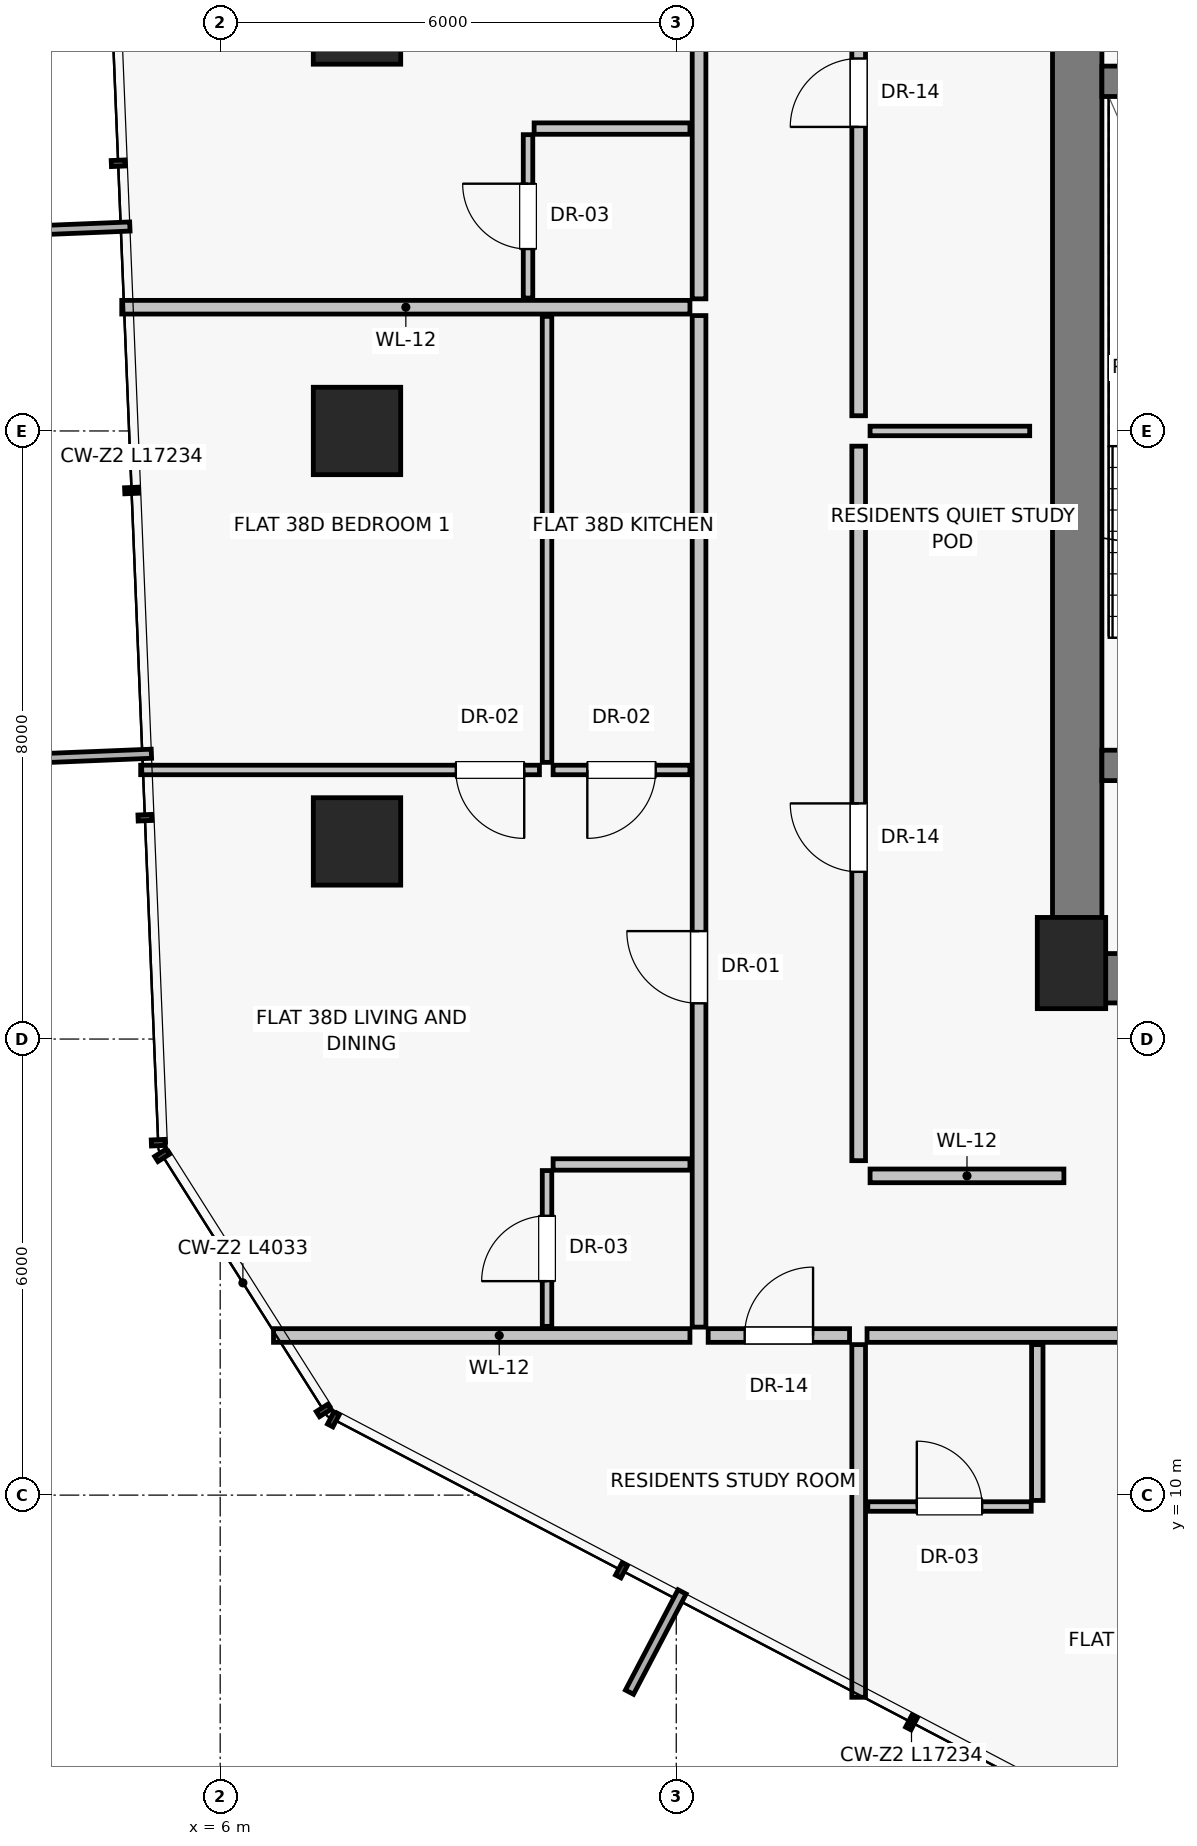
"""IFC4 building model, lengths in metres.
Left out: names, types, materials, properties, quantities, classifications, styles, units other than length and angle.
Written with IfcOpenShell. Run it as: python <this file> out.ifc"""

import sys

from ifc_helpers import new_model, si_unit, direction, frame, frame_2d, origin, origin_2d, place, context, subcontext, project, spatial, rectangle, extrude, source, transform, mapped, element, fill, save


model = new_model("IFC4")
c1 = context("Model", 3, precision=1e-05, world=origin(), true_north=direction((0.0, 1.0)))
c2 = subcontext(c1, "Body", "Model", "MODEL_VIEW")
j1 = project(units=[si_unit("LENGTHUNIT", "METRE"), si_unit("PLANEANGLEUNIT", "RADIAN")], contexts=[c1])
p1 = place(None, origin())
s1 = spatial("IfcSite", under=j1, at=p1, CompositionType="ELEMENT")
p2 = place(p1, origin())
s2 = spatial("IfcBuilding", under=s1, at=p2, CompositionType="ELEMENT")
p3 = place(p2, frame((0.0, 0.0, 136.0)))
s3 = spatial("IfcBuildingStorey", under=s2, at=p3, CompositionType="ELEMENT", Elevation=136.0)
p4 = place(p3, frame((17.2, 17.0, 0.0), z_axis=(0.0, 0.0, 1.0), x_axis=(1.0, 0.0, 0.0)))
e1 = element("IfcColumn", 1, at=p4, inside=s3, PredefinedType="PILASTER", context=c2, shape_type="SweptSolid", body=[
    extrude(rectangle(XDim=0.9, YDim=1.2, at=origin_2d()), origin(), (0.0, 0.0, 1.0), 3.25),
])
for number, where, z_axis, x_axis in (
    (2, (7.8, 29.4, 0.0), (0.0, 0.0, 1.0), (1.0, 0.0, 0.0)),
    (3, (7.8, 24.0, 0.0), (0.0, 0.0, 1.0), (1.0, 0.0, 0.0)),
    (4, (7.8, 18.6, 0.0), (0.0, 0.0, 1.0), (1.0, 0.0, 0.0)),
):
    element("IfcColumn", number, at=place(p3, frame(where, z_axis=z_axis, x_axis=x_axis)), inside=s3, PredefinedType="COLUMN", context=c2, shape_type="SweptSolid", body=[
        extrude(rectangle(XDim=1.15, YDim=1.15, at=origin_2d()), origin(), (0.0, 0.0, 1.0), 3.25),
    ])
p5 = place(p3, frame((17.275, 16.8, 0.0), z_axis=(0.0, 0.0, 1.0), x_axis=(0.0, 1.0, 0.0)))
e5 = element("IfcWall", 5, at=p5, inside=s3, PredefinedType="SHEAR", context=c2, shape_type="SweptSolid", body=[
    extrude(rectangle(XDim=14.2, YDim=0.65, at=frame_2d((7.1, 0.0))), origin(), (0.0, 0.0, 1.0), 3.0),
])
p6 = place(p3, frame((17.2, 16.8, 0.0), z_axis=(0.0, 0.0, 1.0), x_axis=(1.0, 0.0, 0.0)))
e6 = element("IfcWall", 6, at=p6, inside=s3, PredefinedType="SHEAR", context=c2, shape_type="SweptSolid", body=[
    extrude(rectangle(XDim=5.85, YDim=0.65, at=frame_2d((2.925, 0.0))), origin(), (0.0, 0.0, 1.0), 3.0),
])
p7 = place(p6, frame((1.15, 0.0, 0.0)))
e7 = element("IfcOpeningElement", 7, at=p7, cuts=e6, PredefinedType="OPENING", context=c2, shape_type="SweptSolid", body=[
    extrude(rectangle(XDim=1.2, YDim=2.03, at=frame_2d((0.6, 1.015))), frame((0.0, 0.335, 0.0), z_axis=(0.0, -1.0, 0.0), x_axis=(1.0, 0.0, 0.0)), (0.0, 0.0, 1.0), 0.67),
])
p8 = place(p3, frame((17.6, 19.6, 0.0), z_axis=(0.0, 0.0, 1.0), x_axis=(1.0, 0.0, 0.0)))
e8 = element("IfcWall", 8, at=p8, inside=s3, PredefinedType="SHEAR", context=c2, shape_type="SweptSolid", body=[
    extrude(rectangle(XDim=3.4, YDim=0.4, at=frame_2d((1.7, 0.0))), origin(), (0.0, 0.0, 1.0), 3.0),
])
p9 = place(p8, frame((1.05, 0.0, 0.0)))
e9 = element("IfcOpeningElement", 9, at=p9, cuts=e8, PredefinedType="OPENING", context=c2, shape_type="SweptSolid", body=[
    extrude(rectangle(XDim=1.1, YDim=2.03, at=frame_2d((0.55, 1.015))), frame((0.0, 0.21, 0.0), z_axis=(0.0, -1.0, 0.0), x_axis=(1.0, 0.0, 0.0)), (0.0, 0.0, 1.0), 0.42),
])
p10 = place(p3, frame((17.6, 28.6, 0.0), z_axis=(0.0, 0.0, 1.0), x_axis=(1.0, 0.0, 0.0)))
e10 = element("IfcWall", 10, at=p10, inside=s3, PredefinedType="SHEAR", context=c2, shape_type="SweptSolid", body=[
    extrude(rectangle(XDim=3.4, YDim=0.4, at=frame_2d((1.7, 0.0))), origin(), (0.0, 0.0, 1.0), 3.0),
])
p11 = place(p3, frame((14.4, 14.4, 0.0), z_axis=(0.0, 0.0, 1.0), x_axis=(0.0, 1.0, 0.0)))
e11 = element("IfcWall", 11, at=p11, inside=s3, PredefinedType="PARTITIONING", context=c2, shape_type="SweptSolid", body=[
    extrude(rectangle(XDim=9.4, YDim=0.18, at=frame_2d((4.7, 0.0))), origin(), (0.0, 0.0, 1.0), 3.0),
])
p12 = place(p11, frame((3.8, 0.0, 0.0)))
e12 = element("IfcOpeningElement", 12, at=p12, cuts=e11, PredefinedType="OPENING", context=c2, shape_type="SweptSolid", body=[
    extrude(rectangle(XDim=0.9, YDim=2.01, at=frame_2d((0.45, 1.005))), frame((0.0, 0.1, 0.0), z_axis=(0.0, -1.0, 0.0), x_axis=(1.0, 0.0, 0.0)), (0.0, 0.0, 1.0), 0.2),
])
p13 = place(p3, frame((14.4, 24.2, 0.0), z_axis=(0.0, 0.0, 1.0), x_axis=(0.0, 1.0, 0.0)))
e13 = element("IfcWall", 13, at=p13, inside=s3, PredefinedType="PARTITIONING", context=c2, shape_type="SweptSolid", body=[
    extrude(rectangle(XDim=9.2, YDim=0.18, at=frame_2d((4.6, 0.0))), origin(), (0.0, 0.0, 1.0), 3.0),
])
p14 = place(p13, frame((3.8, 0.0, 0.0)))
e14 = element("IfcOpeningElement", 14, at=p14, cuts=e13, PredefinedType="OPENING", context=c2, shape_type="SweptSolid", body=[
    extrude(rectangle(XDim=0.9, YDim=2.01, at=frame_2d((0.45, 1.005))), frame((0.0, 0.1, 0.0), z_axis=(0.0, -1.0, 0.0), x_axis=(1.0, 0.0, 0.0)), (0.0, 0.0, 1.0), 0.2),
])
p15 = place(p3, frame((14.55, 24.0, 0.0), z_axis=(0.0, 0.0, 1.0), x_axis=(1.0, 0.0, 0.0)))
e15 = element("IfcWall", 15, at=p15, inside=s3, PredefinedType="PARTITIONING", context=c2, shape_type="SweptSolid", body=[
    extrude(rectangle(XDim=2.1, YDim=0.125, at=frame_2d((1.05, 0.0))), origin(), (0.0, 0.0, 1.0), 3.0),
])
p16 = place(p3, frame((14.55, 14.2, 0.0), z_axis=(0.0, 0.0, 1.0), x_axis=(1.0, 0.0, 0.0)))
e16 = element("IfcWall", 16, at=p16, inside=s3, PredefinedType="PARTITIONING", context=c2, shape_type="SweptSolid", body=[
    extrude(rectangle(XDim=2.55, YDim=0.18, at=frame_2d((1.275, 0.0))), origin(), (0.0, 0.0, 1.0), 3.0),
])
p17 = place(p3, frame((14.4, 11.98, 0.0), z_axis=(0.0, 0.0, 1.0), x_axis=(0.0, -1.0, 0.0)))
e17 = element("IfcWall", 17, at=p17, inside=s3, PredefinedType="PARTITIONING", context=c2, shape_type="SweptSolid", body=[
    extrude(rectangle(XDim=4.64, YDim=0.18, at=frame_2d((2.32, 0.0))), origin(), (0.0, 0.0, 1.0), 3.0),
])
p18 = place(p3, frame((14.51, 12.1, 0.0), z_axis=(0.0, 0.0, 1.0), x_axis=(1.0, 0.0, 0.0)))
e18 = element("IfcWall", 18, at=p18, inside=s3, PredefinedType="PARTITIONING", context=c2, shape_type="SweptSolid", body=[
    extrude(rectangle(XDim=5.996, YDim=0.18, at=frame_2d((2.998, 0.0))), origin(), (0.0, 0.0, 1.0), 2.58),
])
p19 = place(p18, frame((3.638, 0.0, 0.0)))
e19 = element("IfcOpeningElement", 19, at=p19, cuts=e18, PredefinedType="OPENING", context=c2, shape_type="SweptSolid", body=[
    extrude(rectangle(XDim=0.95, YDim=2.02, at=frame_2d((0.475, 1.01))), frame((0.0, 0.1, 0.0), z_axis=(0.0, -1.0, 0.0), x_axis=(1.0, 0.0, 0.0)), (0.0, 0.0, 1.0), 0.2),
])
p20 = place(p3, frame((16.75, 11.98, 0.0), z_axis=(0.0, 0.0, 1.0), x_axis=(0.0, -1.0, 0.0)))
e20 = element("IfcWall", 20, at=p20, inside=s3, PredefinedType="PARTITIONING", context=c2, shape_type="SweptSolid", body=[
    extrude(rectangle(XDim=2.05, YDim=0.15, at=frame_2d((1.025, 0.0))), origin(), (0.0, 0.0, 1.0), 3.0),
])
p21 = place(p3, frame((14.52, 9.85, 0.0), z_axis=(0.0, 0.0, 1.0), x_axis=(1.0, 0.0, 0.0)))
e21 = element("IfcWall", 21, at=p21, inside=s3, PredefinedType="PARTITIONING", context=c2, shape_type="SweptSolid", body=[
    extrude(rectangle(XDim=2.15, YDim=0.125, at=frame_2d((1.075, 0.0))), origin(), (0.0, 0.0, 1.0), 3.0),
])
p22 = place(p21, frame((0.645, 0.0, 0.0)))
e22 = element("IfcOpeningElement", 22, at=p22, cuts=e21, PredefinedType="OPENING", context=c2, shape_type="SweptSolid", body=[
    extrude(rectangle(XDim=0.86, YDim=2.01, at=frame_2d((0.43, 1.005))), frame((0.0, 0.073, 0.0), z_axis=(0.0, -1.0, 0.0), x_axis=(1.0, 0.0, 0.0)), (0.0, 0.0, 1.0), 0.145),
])
p23 = place(p3, frame((12.18, 12.1, 0.0), z_axis=(0.0, 0.0, 1.0), x_axis=(-1.0, 0.0, 0.0)))
e23 = element("IfcWall", 23, at=p23, inside=s3, PredefinedType="PARTITIONING", context=c2, shape_type="SweptSolid", body=[
    extrude(rectangle(XDim=5.479, YDim=0.18, at=frame_2d((2.739, 0.0))), origin(), (0.0, 0.0, 1.0), 3.0),
])
p24 = place(p3, frame((12.3, 12.21, 0.0), z_axis=(0.0, 0.0, 1.0), x_axis=(0.0, 1.0, 0.0)))
e24 = element("IfcWall", 24, at=p24, inside=s3, PredefinedType="PARTITIONING", context=c2, shape_type="SweptSolid", body=[
    extrude(rectangle(XDim=13.308, YDim=0.18, at=frame_2d((6.654, 0.0))), origin(), (0.0, 0.0, 1.0), 2.58),
])
p25 = place(p24, frame((4.26, 0.0, 0.0)))
e25 = element("IfcOpeningElement", 25, at=p25, cuts=e24, PredefinedType="OPENING", context=c2, shape_type="SweptSolid", body=[
    extrude(rectangle(XDim=0.95, YDim=2.02, at=frame_2d((0.475, 1.01))), frame((0.0, 0.1, 0.0), z_axis=(0.0, -1.0, 0.0), x_axis=(1.0, 0.0, 0.0)), (0.0, 0.0, 1.0), 0.2),
])
p26 = place(p3, frame((12.18, 14.35, 0.0), z_axis=(0.0, 0.0, 1.0), x_axis=(-1.0, 0.0, 0.0)))
e26 = element("IfcWall", 26, at=p26, inside=s3, PredefinedType="PARTITIONING", context=c2, shape_type="SweptSolid", body=[
    extrude(rectangle(XDim=1.8, YDim=0.15, at=frame_2d((0.9, 0.0))), origin(), (0.0, 0.0, 1.0), 3.0),
])
p27 = place(p3, frame((10.3, 12.22, 0.0), z_axis=(0.0, 0.0, 1.0), x_axis=(0.0, 1.0, 0.0)))
e27 = element("IfcWall", 27, at=p27, inside=s3, PredefinedType="PARTITIONING", context=c2, shape_type="SweptSolid", body=[
    extrude(rectangle(XDim=2.05, YDim=0.125, at=frame_2d((1.025, 0.0))), origin(), (0.0, 0.0, 1.0), 3.0),
])
p28 = place(p27, frame((0.595, 0.0, 0.0)))
e28 = element("IfcOpeningElement", 28, at=p28, cuts=e27, PredefinedType="OPENING", context=c2, shape_type="SweptSolid", body=[
    extrude(rectangle(XDim=0.86, YDim=2.01, at=frame_2d((0.43, 1.005))), frame((0.0, 0.073, 0.0), z_axis=(0.0, -1.0, 0.0), x_axis=(1.0, 0.0, 0.0)), (0.0, 0.0, 1.0), 0.145),
])
p29 = place(p3, frame((12.18, 19.54, 0.0), z_axis=(0.0, 0.0, 1.0), x_axis=(-1.0, 0.0, 0.0)))
e29 = element("IfcWall", 29, at=p29, inside=s3, PredefinedType="PARTITIONING", context=c2, shape_type="SweptSolid", body=[
    extrude(rectangle(XDim=1.8, YDim=0.125, at=frame_2d((0.9, 0.0))), origin(), (0.0, 0.0, 1.0), 3.0),
])
p30 = place(p29, frame((0.45, 0.0, 0.0)))
e30 = element("IfcOpeningElement", 30, at=p30, cuts=e29, PredefinedType="OPENING", context=c2, shape_type="SweptSolid", body=[
    extrude(rectangle(XDim=0.9, YDim=2.01, at=frame_2d((0.45, 1.005))), frame((0.0, 0.073, 0.0), z_axis=(0.0, -1.0, 0.0), x_axis=(1.0, 0.0, 0.0)), (0.0, 0.0, 1.0), 0.145),
])
p31 = place(p3, frame((10.3, 19.64, 0.0), z_axis=(0.0, 0.0, 1.0), x_axis=(0.0, 1.0, 0.0)))
e31 = element("IfcWall", 31, at=p31, inside=s3, PredefinedType="PARTITIONING", context=c2, shape_type="SweptSolid", body=[
    extrude(rectangle(XDim=5.868, YDim=0.125, at=frame_2d((2.934, 0.0))), origin(), (0.0, 0.0, 1.0), 3.0),
])
p32 = place(p3, frame((10.2, 19.54, 0.0), z_axis=(0.0, 0.0, 1.0), x_axis=(-1.0, 0.0, 0.0)))
e32 = element("IfcWall", 32, at=p32, inside=s3, PredefinedType="PARTITIONING", context=c2, shape_type="SweptSolid", body=[
    extrude(rectangle(XDim=5.246, YDim=0.125, at=frame_2d((2.623, 0.0))), origin(), (0.0, 0.0, 1.0), 3.0),
])
p33 = place(p32, frame((0.2, 0.0, 0.0)))
e33 = element("IfcOpeningElement", 33, at=p33, cuts=e32, PredefinedType="OPENING", context=c2, shape_type="SweptSolid", body=[
    extrude(rectangle(XDim=0.9, YDim=2.01, at=frame_2d((0.45, 1.005))), frame((0.0, 0.073, 0.0), z_axis=(0.0, -1.0, 0.0), x_axis=(1.0, 0.0, 0.0)), (0.0, 0.0, 1.0), 0.145),
])
p34 = place(p3, frame((12.18, 25.628, 0.0), z_axis=(0.0, 0.0, 1.0), x_axis=(-1.0, 0.0, 0.0)))
e34 = element("IfcWall", 34, at=p34, inside=s3, PredefinedType="PARTITIONING", context=c2, shape_type="SweptSolid", body=[
    extrude(rectangle(XDim=7.475, YDim=0.18, at=frame_2d((3.738, 0.0))), origin(), (0.0, 0.0, 1.0), 3.0),
])
p35 = place(p3, frame((12.3, 25.738, 0.0), z_axis=(0.0, 0.0, 1.0), x_axis=(0.0, 1.0, 0.0)))
e35 = element("IfcWall", 35, at=p35, inside=s3, PredefinedType="PARTITIONING", context=c2, shape_type="SweptSolid", body=[
    extrude(rectangle(XDim=6.902, YDim=0.18, at=frame_2d((3.451, 0.0))), origin(), (0.0, 0.0, 1.0), 2.58),
])
p36 = place(p35, frame((4.309, 0.0, 0.0)))
e36 = element("IfcOpeningElement", 36, at=p36, cuts=e35, PredefinedType="OPENING", context=c2, shape_type="SweptSolid", body=[
    extrude(rectangle(XDim=0.95, YDim=2.02, at=frame_2d((0.475, 1.01))), frame((0.0, 0.1, 0.0), z_axis=(0.0, -1.0, 0.0), x_axis=(1.0, 0.0, 0.0)), (0.0, 0.0, 1.0), 0.2),
])
p37 = place(p3, frame((12.18, 27.978, 0.0), z_axis=(0.0, 0.0, 1.0), x_axis=(-1.0, 0.0, 0.0)))
e37 = element("IfcWall", 37, at=p37, inside=s3, PredefinedType="PARTITIONING", context=c2, shape_type="SweptSolid", body=[
    extrude(rectangle(XDim=2.05, YDim=0.15, at=frame_2d((1.025, 0.0))), origin(), (0.0, 0.0, 1.0), 3.0),
])
p38 = place(p3, frame((10.05, 25.748, 0.0), z_axis=(0.0, 0.0, 1.0), x_axis=(0.0, 1.0, 0.0)))
e38 = element("IfcWall", 38, at=p38, inside=s3, PredefinedType="PARTITIONING", context=c2, shape_type="SweptSolid", body=[
    extrude(rectangle(XDim=2.15, YDim=0.125, at=frame_2d((1.075, 0.0))), origin(), (0.0, 0.0, 1.0), 3.0),
])
p39 = place(p38, frame((0.645, 0.0, 0.0)))
e39 = element("IfcOpeningElement", 39, at=p39, cuts=e38, PredefinedType="OPENING", context=c2, shape_type="SweptSolid", body=[
    extrude(rectangle(XDim=0.86, YDim=2.01, at=frame_2d((0.43, 1.005))), frame((0.0, 0.073, 0.0), z_axis=(0.0, -1.0, 0.0), x_axis=(1.0, 0.0, 0.0)), (0.0, 0.0, 1.0), 0.145),
])
p40 = place(p3, frame((12.42, 12.1, 0.0), z_axis=(0.0, 0.0, 1.0), x_axis=(1.0, 0.0, 0.0)))
e40 = element("IfcWall", 40, at=p40, inside=s3, PredefinedType="PARTITIONING", context=c2, shape_type="SweptSolid", body=[
    extrude(rectangle(XDim=1.86, YDim=0.18, at=frame_2d((0.93, 0.0))), origin(), (0.0, 0.0, 1.0), 3.0),
])
p41 = place(p40, frame((0.48, 0.0, 0.0)))
e41 = element("IfcOpeningElement", 41, at=p41, cuts=e40, PredefinedType="OPENING", context=c2, shape_type="SweptSolid", body=[
    extrude(rectangle(XDim=0.9, YDim=2.01, at=frame_2d((0.45, 1.005))), frame((0.0, 0.1, 0.0), z_axis=(0.0, -1.0, 0.0), x_axis=(1.0, 0.0, 0.0)), (0.0, 0.0, 1.0), 0.2),
])
m1 = source(origin(), c2, "Body", "SweptSolid", [
    extrude(rectangle(XDim=0.9, YDim=2.01, at=frame_2d((0.45, 1.005))), frame((0.0, 0.025, 0.0), z_axis=(0.0, -1.0, 0.0), x_axis=(1.0, 0.0, 0.0)), (0.0, 0.0, 1.0), 0.05),
])
p42 = place(p12, origin())
e42 = element("IfcDoor", 42, at=p42, inside=s3, OperationType="SINGLE_SWING_RIGHT", PredefinedType="DOOR", context=c2, shape_type="MappedRepresentation", body=[
    mapped(m1, transform((0.0, 0.0, 0.0), scale=1.0)),
])
fill(e12, e42)
p43 = place(p14, origin())
e43 = element("IfcDoor", 43, at=p43, inside=s3, OperationType="SINGLE_SWING_LEFT", PredefinedType="DOOR", context=c2, shape_type="MappedRepresentation", body=[
    mapped(m1, transform((0.0, 0.0, 0.0), scale=1.0)),
])
fill(e14, e43)
m2 = source(origin(), c2, "Body", "SweptSolid", [
    extrude(rectangle(XDim=0.86, YDim=2.01, at=frame_2d((0.43, 1.005))), frame((0.0, 0.025, 0.0), z_axis=(0.0, -1.0, 0.0), x_axis=(1.0, 0.0, 0.0)), (0.0, 0.0, 1.0), 0.05),
])
p44 = place(p22, origin())
e44 = element("IfcDoor", 44, at=p44, inside=s3, OperationType="SINGLE_SWING_LEFT", PredefinedType="DOOR", context=c2, shape_type="MappedRepresentation", body=[
    mapped(m2, transform((0.0, 0.0, 0.0), scale=1.0)),
])
fill(e22, e44)
m3 = source(origin(), c2, "Body", "SweptSolid", [
    extrude(rectangle(XDim=0.95, YDim=2.02, at=frame_2d((0.475, 1.01))), frame((0.0, 0.025, 0.0), z_axis=(0.0, -1.0, 0.0), x_axis=(1.0, 0.0, 0.0)), (0.0, 0.0, 1.0), 0.05),
])
p45 = place(p25, origin())
e45 = element("IfcDoor", 45, at=p45, inside=s3, OperationType="SINGLE_SWING_RIGHT", PredefinedType="DOOR", context=c2, shape_type="MappedRepresentation", body=[
    mapped(m3, transform((0.0, 0.0, 0.0), scale=1.0)),
])
fill(e25, e45)
p46 = place(p28, origin())
e46 = element("IfcDoor", 46, at=p46, inside=s3, OperationType="SINGLE_SWING_LEFT", PredefinedType="DOOR", context=c2, shape_type="MappedRepresentation", body=[
    mapped(m2, transform((0.0, 0.0, 0.0), scale=1.0)),
])
fill(e28, e46)
p47 = place(p30, origin())
e47 = element("IfcDoor", 47, at=p47, inside=s3, OperationType="SINGLE_SWING_RIGHT", PredefinedType="DOOR", context=c2, shape_type="MappedRepresentation", body=[
    mapped(m1, transform((0.0, 0.0, 0.0), scale=1.0)),
])
fill(e30, e47)
p48 = place(p33, origin())
e48 = element("IfcDoor", 48, at=p48, inside=s3, OperationType="SINGLE_SWING_LEFT", PredefinedType="DOOR", context=c2, shape_type="MappedRepresentation", body=[
    mapped(m1, transform((0.0, 0.0, 0.0), scale=1.0)),
])
fill(e33, e48)
p49 = place(p39, origin())
e49 = element("IfcDoor", 49, at=p49, inside=s3, OperationType="SINGLE_SWING_RIGHT", PredefinedType="DOOR", context=c2, shape_type="MappedRepresentation", body=[
    mapped(m2, transform((0.0, 0.0, 0.0), scale=1.0)),
])
fill(e39, e49)
p50 = place(p41, origin())
e50 = element("IfcDoor", 50, at=p50, inside=s3, OperationType="SINGLE_SWING_RIGHT", PredefinedType="DOOR", context=c2, shape_type="MappedRepresentation", body=[
    mapped(m1, transform((0.0, 0.0, 0.0), scale=1.0)),
])
fill(e41, e50)
save(model, sys.argv[1])
